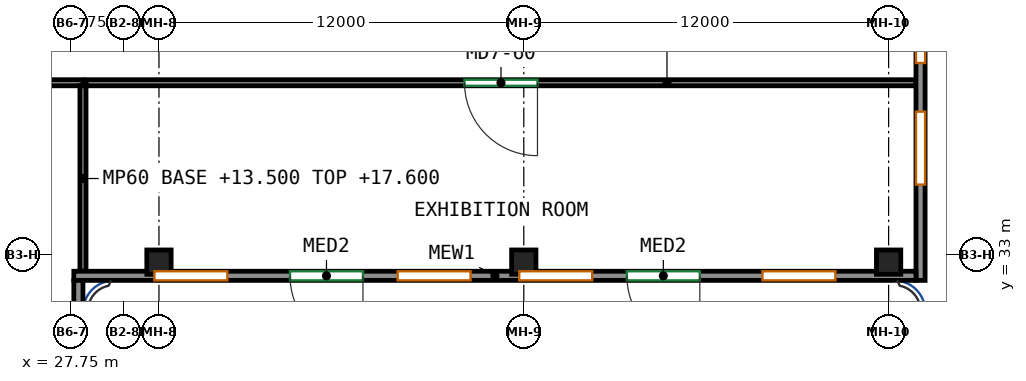
"""IFC4 building model, lengths in metres.
Left out: names, types, materials, properties, quantities, classifications, styles, units other than length and angle.
Written with IfcOpenShell. Run it as: python <this file> out.ifc"""

import sys

from ifc_helpers import new_model, si_unit, direction, frame, frame_2d, origin, origin_2d, place, context, subcontext, project, spatial, rectangle, extrude, source, transform, mapped, element, fill, save


model = new_model("IFC4")
c1 = context("Model", 3, precision=1e-05, world=origin(), true_north=direction((0.0, 1.0)))
c2 = subcontext(c1, "Body", "Model", "MODEL_VIEW")
j1 = project(units=[si_unit("LENGTHUNIT", "METRE"), si_unit("PLANEANGLEUNIT", "RADIAN")], contexts=[c1])
p1 = place(None, origin())
s1 = spatial("IfcSite", under=j1, at=p1, CompositionType="ELEMENT")
p2 = place(p1, origin())
s2 = spatial("IfcBuilding", under=s1, at=p2, CompositionType="ELEMENT")
p3 = place(p2, frame((0.0, 0.0, 13.5)))
s3 = spatial("IfcBuildingStorey", under=s2, at=p3, CompositionType="ELEMENT", Elevation=13.5)
m1 = source(origin(), c2, "Body", "SweptSolid", [
    extrude(rectangle(XDim=0.8, YDim=0.8, at=origin_2d()), origin(), (0.0, 0.0, 1.0), 4.1),
])
for number, where, z_axis, x_axis in (
    (1, (30.65, 32.75, 0.0), (0.0, 0.0, 1.0), (1.0, 0.0, 0.0)),
    (2, (42.65, 32.75, 0.0), (0.0, 0.0, 1.0), (1.0, 0.0, 0.0)),
    (3, (54.65, 32.75, 0.0), (0.0, 0.0, 1.0), (1.0, 0.0, 0.0)),
):
    element("IfcColumn", number, at=place(p3, frame(where, z_axis=z_axis, x_axis=x_axis)), inside=s3, PredefinedType="COLUMN", context=c2, shape_type="MappedRepresentation", body=[
        mapped(m1, transform((0.0, 0.0, 0.0))),
    ])
m2 = source(origin(), c2, "Body", "SweptSolid", [
    extrude(rectangle(XDim=24.7, YDim=0.3, at=frame_2d((12.35, 0.0))), origin(), (0.0, 0.0, 1.0), 4.1),
])
p4 = place(p3, frame((55.7, 56.85, 0.0), z_axis=(0.0, 0.0, 1.0), x_axis=(0.0, -1.0, 0.0)))
e4 = element("IfcWall", 4, at=p4, inside=s3, PredefinedType="SOLIDWALL", context=c2, shape_type="MappedRepresentation", body=[
    mapped(m2, transform((0.0, 0.0, 0.0))),
])
p5 = place(p4, frame((3.15, 0.0, 0.9)))
e5 = element("IfcOpeningElement", 5, at=p5, cuts=e4, PredefinedType="OPENING", context=c2, shape_type="SweptSolid", body=[
    extrude(rectangle(XDim=2.4, YDim=1.8, at=frame_2d((1.2, 0.9))), frame((0.0, 0.16, 0.0), z_axis=(0.0, -1.0, 0.0), x_axis=(1.0, 0.0, 0.0)), (0.0, 0.0, 1.0), 0.32),
])
p6 = place(p4, frame((7.15, 0.0, 0.9)))
e6 = element("IfcOpeningElement", 6, at=p6, cuts=e4, PredefinedType="OPENING", context=c2, shape_type="SweptSolid", body=[
    extrude(rectangle(XDim=2.4, YDim=1.8, at=frame_2d((1.2, 0.9))), frame((0.0, 0.16, 0.0), z_axis=(0.0, -1.0, 0.0), x_axis=(1.0, 0.0, 0.0)), (0.0, 0.0, 1.0), 0.32),
])
p7 = place(p4, frame((11.15, 0.0, 0.9)))
e7 = element("IfcOpeningElement", 7, at=p7, cuts=e4, PredefinedType="OPENING", context=c2, shape_type="SweptSolid", body=[
    extrude(rectangle(XDim=2.4, YDim=1.8, at=frame_2d((1.2, 0.9))), frame((0.0, 0.16, 0.0), z_axis=(0.0, -1.0, 0.0), x_axis=(1.0, 0.0, 0.0)), (0.0, 0.0, 1.0), 0.32),
])
p8 = place(p4, frame((15.15, 0.0, 0.9)))
e8 = element("IfcOpeningElement", 8, at=p8, cuts=e4, PredefinedType="OPENING", context=c2, shape_type="SweptSolid", body=[
    extrude(rectangle(XDim=2.4, YDim=1.8, at=frame_2d((1.2, 0.9))), frame((0.0, 0.16, 0.0), z_axis=(0.0, -1.0, 0.0), x_axis=(1.0, 0.0, 0.0)), (0.0, 0.0, 1.0), 0.32),
])
p9 = place(p4, frame((19.15, 0.0, 0.9)))
e9 = element("IfcOpeningElement", 9, at=p9, cuts=e4, PredefinedType="OPENING", context=c2, shape_type="SweptSolid", body=[
    extrude(rectangle(XDim=2.4, YDim=1.8, at=frame_2d((1.2, 0.9))), frame((0.0, 0.16, 0.0), z_axis=(0.0, -1.0, 0.0), x_axis=(1.0, 0.0, 0.0)), (0.0, 0.0, 1.0), 0.32),
])
m3 = source(origin(), c2, "Body", "SweptSolid", [
    extrude(rectangle(XDim=27.7, YDim=0.3, at=frame_2d((13.85, 0.0))), origin(), (0.0, 0.0, 1.0), 4.1),
])
p10 = place(p3, frame((55.55, 32.3, 0.0), z_axis=(0.0, 0.0, 1.0), x_axis=(-1.0, 0.0, 0.0)))
e10 = element("IfcWall", 10, at=p10, inside=s3, PredefinedType="SOLIDWALL", context=c2, shape_type="MappedRepresentation", body=[
    mapped(m3, transform((0.0, 0.0, 0.0))),
])
p11 = place(p10, frame((7.11, 0.0, 0.0)))
e11 = element("IfcOpeningElement", 11, at=p11, cuts=e10, PredefinedType="OPENING", context=c2, shape_type="SweptSolid", body=[
    extrude(rectangle(XDim=2.4, YDim=2.4, at=frame_2d((1.2, 1.2))), frame((0.0, 0.16, 0.0), z_axis=(0.0, -1.0, 0.0), x_axis=(1.0, 0.0, 0.0)), (0.0, 0.0, 1.0), 0.32),
])
p12 = place(p10, frame((18.19, 0.0, 0.0)))
e12 = element("IfcOpeningElement", 12, at=p12, cuts=e10, PredefinedType="OPENING", context=c2, shape_type="SweptSolid", body=[
    extrude(rectangle(XDim=2.4, YDim=2.4, at=frame_2d((1.2, 1.2))), frame((0.0, 0.16, 0.0), z_axis=(0.0, -1.0, 0.0), x_axis=(1.0, 0.0, 0.0)), (0.0, 0.0, 1.0), 0.32),
])
p13 = place(p10, frame((2.65, 0.0, 0.9)))
e13 = element("IfcOpeningElement", 13, at=p13, cuts=e10, PredefinedType="OPENING", context=c2, shape_type="SweptSolid", body=[
    extrude(rectangle(XDim=2.4, YDim=1.8, at=frame_2d((1.2, 0.9))), frame((0.0, 0.16, 0.0), z_axis=(0.0, -1.0, 0.0), x_axis=(1.0, 0.0, 0.0)), (0.0, 0.0, 1.0), 0.32),
])
p14 = place(p10, frame((10.65, 0.0, 0.9)))
e14 = element("IfcOpeningElement", 14, at=p14, cuts=e10, PredefinedType="OPENING", context=c2, shape_type="SweptSolid", body=[
    extrude(rectangle(XDim=2.4, YDim=1.8, at=frame_2d((1.2, 0.9))), frame((0.0, 0.16, 0.0), z_axis=(0.0, -1.0, 0.0), x_axis=(1.0, 0.0, 0.0)), (0.0, 0.0, 1.0), 0.32),
])
p15 = place(p10, frame((14.65, 0.0, 0.9)))
e15 = element("IfcOpeningElement", 15, at=p15, cuts=e10, PredefinedType="OPENING", context=c2, shape_type="SweptSolid", body=[
    extrude(rectangle(XDim=2.4, YDim=1.8, at=frame_2d((1.2, 0.9))), frame((0.0, 0.16, 0.0), z_axis=(0.0, -1.0, 0.0), x_axis=(1.0, 0.0, 0.0)), (0.0, 0.0, 1.0), 0.32),
])
p16 = place(p10, frame((22.65, 0.0, 0.9)))
e16 = element("IfcOpeningElement", 16, at=p16, cuts=e10, PredefinedType="OPENING", context=c2, shape_type="SweptSolid", body=[
    extrude(rectangle(XDim=2.4, YDim=1.8, at=frame_2d((1.2, 0.9))), frame((0.0, 0.16, 0.0), z_axis=(0.0, -1.0, 0.0), x_axis=(1.0, 0.0, 0.0)), (0.0, 0.0, 1.0), 0.32),
])
m4 = source(origin(), c2, "Body", "SweptSolid", [
    extrude(rectangle(XDim=4.0, YDim=0.3, at=frame_2d((2.0, 0.0))), origin(), (0.0, 0.0, 1.0), 4.1),
])
p17 = place(p3, frame((28.0, 32.15, 0.0), z_axis=(0.0, 0.0, 1.0), x_axis=(0.0, -1.0, 0.0)))
e17 = element("IfcWall", 17, at=p17, inside=s3, PredefinedType="SOLIDWALL", context=c2, shape_type="MappedRepresentation", body=[
    mapped(m4, transform((0.0, 0.0, 0.0))),
])
m5 = source(origin(), c2, "Body", "SweptSolid", [
    extrude(rectangle(XDim=18.05, YDim=0.2, at=frame_2d((9.025, 0.0))), origin(), (0.0, 0.0, 1.0), 3.3),
])
p18 = place(p3, frame((28.15, 38.65, 0.0), z_axis=(0.0, 0.0, 1.0), x_axis=(-1.0, 0.0, 0.0)))
e18 = element("IfcWall", 18, at=p18, inside=s3, PredefinedType="PARTITIONING", context=c2, shape_type="MappedRepresentation", body=[
    mapped(m5, transform((0.0, 0.0, 0.0))),
])
p19 = place(p18, frame((7.825, 0.0, 0.0)))
e19 = element("IfcOpeningElement", 19, at=p19, cuts=e18, PredefinedType="OPENING", context=c2, shape_type="SweptSolid", body=[
    extrude(rectangle(XDim=2.4, YDim=2.4, at=frame_2d((1.2, 1.2))), frame((0.0, 0.11, 0.0), z_axis=(0.0, -1.0, 0.0), x_axis=(1.0, 0.0, 0.0)), (0.0, 0.0, 1.0), 0.22),
])
m6 = source(origin(), c2, "Body", "SweptSolid", [
    extrude(rectangle(XDim=6.1, YDim=0.2, at=frame_2d((3.05, 0.0))), origin(), (0.0, 0.0, 1.0), 4.1),
])
p20 = place(p3, frame((28.15, 38.55, 0.0), z_axis=(0.0, 0.0, 1.0), x_axis=(0.0, -1.0, 0.0)))
e20 = element("IfcWall", 20, at=p20, inside=s3, PredefinedType="PARTITIONING", context=c2, shape_type="MappedRepresentation", body=[
    mapped(m6, transform((0.0, 0.0, 0.0))),
])
m7 = source(origin(), c2, "Body", "SweptSolid", [
    extrude(rectangle(XDim=27.3, YDim=0.2, at=frame_2d((13.65, 0.0))), origin(), (0.0, 0.0, 1.0), 2.8),
])
p21 = place(p3, frame((55.55, 38.65, 0.0), z_axis=(0.0, 0.0, 1.0), x_axis=(-1.0, 0.0, 0.0)))
e21 = element("IfcWall", 21, at=p21, inside=s3, PredefinedType="PARTITIONING", context=c2, shape_type="MappedRepresentation", body=[
    mapped(m7, transform((0.0, 0.0, 0.0))),
])
p22 = place(p21, frame((12.45, 0.0, 0.0)))
e22 = element("IfcOpeningElement", 22, at=p22, cuts=e21, PredefinedType="OPENING", context=c2, shape_type="SweptSolid", body=[
    extrude(rectangle(XDim=2.4, YDim=2.4, at=frame_2d((1.2, 1.2))), frame((0.0, 0.11, 0.0), z_axis=(0.0, -1.0, 0.0), x_axis=(1.0, 0.0, 0.0)), (0.0, 0.0, 1.0), 0.22),
])
p23 = place(p11, origin())
e23 = element("IfcDoor", 23, at=p23, inside=s3, OperationType="DOUBLE_DOOR_SINGLE_SWING", PredefinedType="DOOR", context=c2, shape_type="SweptSolid", body=[
    extrude(rectangle(XDim=2.4, YDim=2.4, at=frame_2d((1.2, 1.2))), frame((0.0, 0.025, 0.0), z_axis=(0.0, -1.0, 0.0), x_axis=(1.0, 0.0, 0.0)), (0.0, 0.0, 1.0), 0.05),
])
fill(e11, e23)
p24 = place(p12, origin())
e24 = element("IfcDoor", 24, at=p24, inside=s3, OperationType="DOUBLE_DOOR_SINGLE_SWING", PredefinedType="DOOR", context=c2, shape_type="SweptSolid", body=[
    extrude(rectangle(XDim=2.4, YDim=2.4, at=frame_2d((1.2, 1.2))), frame((0.0, 0.025, 0.0), z_axis=(0.0, -1.0, 0.0), x_axis=(1.0, 0.0, 0.0)), (0.0, 0.0, 1.0), 0.05),
])
fill(e12, e24)
p25 = place(p8, origin())
e25 = element("IfcWindow", 25, at=p25, inside=s3, PartitioningType="SINGLE_PANEL", PredefinedType="WINDOW", context=c2, shape_type="SweptSolid", body=[
    extrude(rectangle(XDim=2.4, YDim=1.8, at=frame_2d((1.2, 0.9))), frame((0.0, 0.03, 0.0), z_axis=(0.0, -1.0, 0.0), x_axis=(1.0, 0.0, 0.0)), (0.0, 0.0, 1.0), 0.06),
])
fill(e8, e25)
p26 = place(p9, origin())
e26 = element("IfcWindow", 26, at=p26, inside=s3, PartitioningType="SINGLE_PANEL", PredefinedType="WINDOW", context=c2, shape_type="SweptSolid", body=[
    extrude(rectangle(XDim=2.4, YDim=1.8, at=frame_2d((1.2, 0.9))), frame((0.0, 0.03, 0.0), z_axis=(0.0, -1.0, 0.0), x_axis=(1.0, 0.0, 0.0)), (0.0, 0.0, 1.0), 0.06),
])
fill(e9, e26)
p27 = place(p13, origin())
e27 = element("IfcWindow", 27, at=p27, inside=s3, PartitioningType="SINGLE_PANEL", PredefinedType="WINDOW", context=c2, shape_type="SweptSolid", body=[
    extrude(rectangle(XDim=2.4, YDim=1.8, at=frame_2d((1.2, 0.9))), frame((0.0, 0.03, 0.0), z_axis=(0.0, -1.0, 0.0), x_axis=(1.0, 0.0, 0.0)), (0.0, 0.0, 1.0), 0.06),
])
fill(e13, e27)
p28 = place(p14, origin())
e28 = element("IfcWindow", 28, at=p28, inside=s3, PartitioningType="SINGLE_PANEL", PredefinedType="WINDOW", context=c2, shape_type="SweptSolid", body=[
    extrude(rectangle(XDim=2.4, YDim=1.8, at=frame_2d((1.2, 0.9))), frame((0.0, 0.03, 0.0), z_axis=(0.0, -1.0, 0.0), x_axis=(1.0, 0.0, 0.0)), (0.0, 0.0, 1.0), 0.06),
])
fill(e14, e28)
p29 = place(p15, origin())
e29 = element("IfcWindow", 29, at=p29, inside=s3, PartitioningType="SINGLE_PANEL", PredefinedType="WINDOW", context=c2, shape_type="SweptSolid", body=[
    extrude(rectangle(XDim=2.4, YDim=1.8, at=frame_2d((1.2, 0.9))), frame((0.0, 0.03, 0.0), z_axis=(0.0, -1.0, 0.0), x_axis=(1.0, 0.0, 0.0)), (0.0, 0.0, 1.0), 0.06),
])
fill(e15, e29)
p30 = place(p16, origin())
e30 = element("IfcWindow", 30, at=p30, inside=s3, PartitioningType="SINGLE_PANEL", PredefinedType="WINDOW", context=c2, shape_type="SweptSolid", body=[
    extrude(rectangle(XDim=2.4, YDim=1.8, at=frame_2d((1.2, 0.9))), frame((0.0, 0.03, 0.0), z_axis=(0.0, -1.0, 0.0), x_axis=(1.0, 0.0, 0.0)), (0.0, 0.0, 1.0), 0.06),
])
fill(e16, e30)
p31 = place(p22, origin())
e31 = element("IfcDoor", 31, at=p31, inside=s3, OperationType="DOUBLE_DOOR_SINGLE_SWING", PredefinedType="DOOR", context=c2, shape_type="SweptSolid", body=[
    extrude(rectangle(XDim=2.4, YDim=2.4, at=frame_2d((1.2, 1.2))), frame((0.0, 0.025, 0.0), z_axis=(0.0, -1.0, 0.0), x_axis=(1.0, 0.0, 0.0)), (0.0, 0.0, 1.0), 0.05),
])
fill(e22, e31)
save(model, sys.argv[1])
